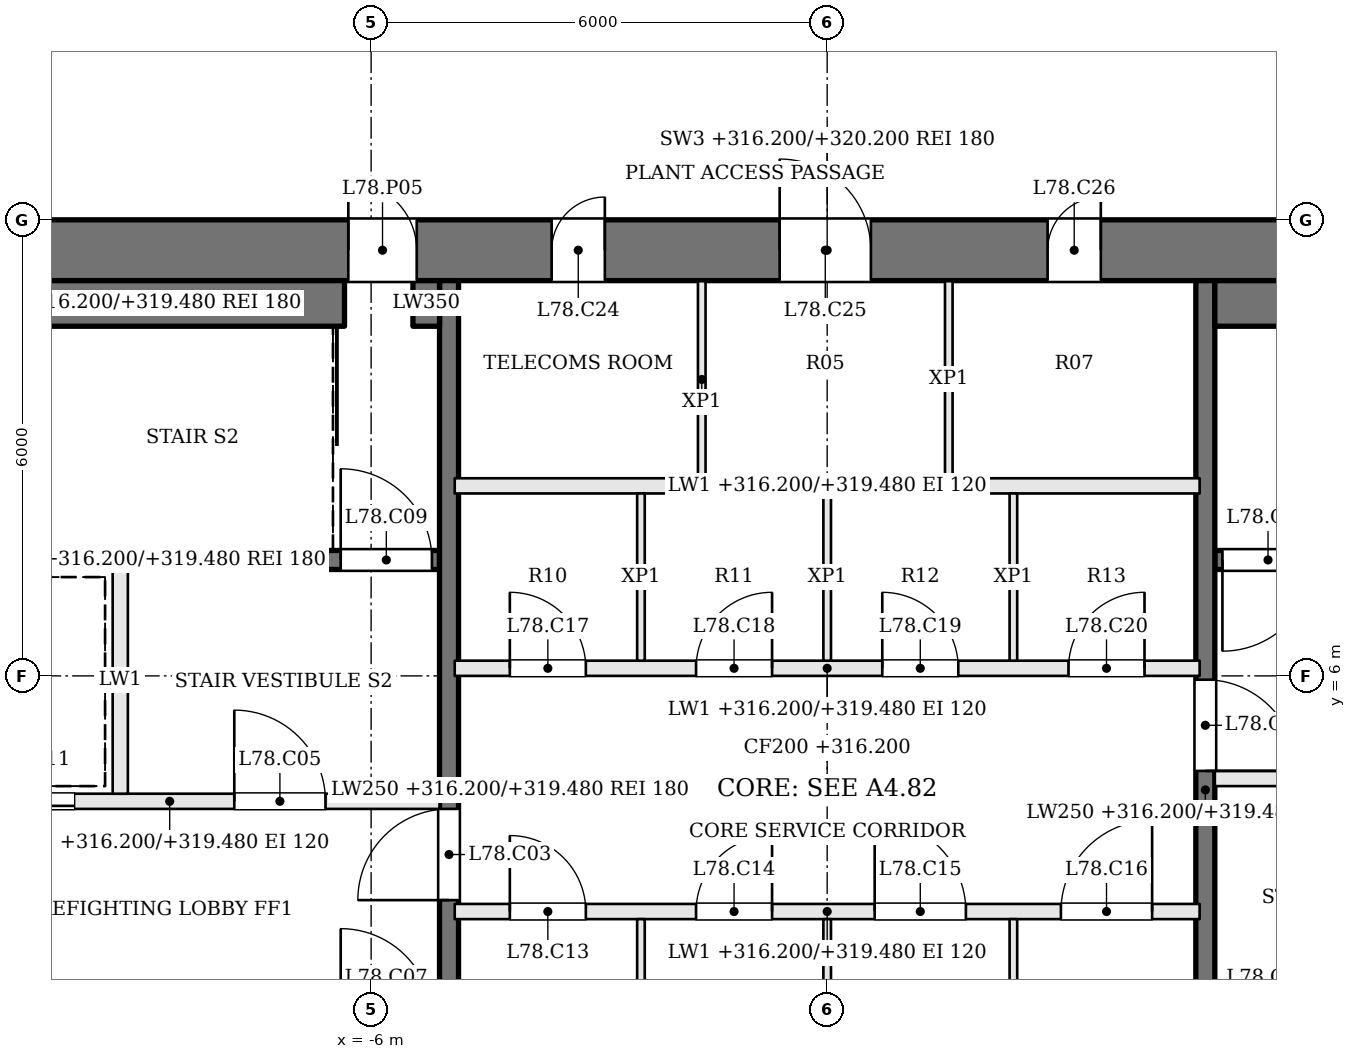
"""IFC4 building model, lengths in metres.
Left out: names, types, materials, properties, quantities, classifications, styles, units other than length and angle.
Written with IfcOpenShell. Run it as: python <this file> out.ifc"""

import sys

from ifc_helpers import new_model, si_unit, direction, frame, frame_2d, origin, place, context, subcontext, project, spatial, rectangle, extrude, element, fill, save


model = new_model("IFC4")
c1 = context("Model", 3, precision=1e-05, world=origin(), true_north=direction((0.0, 1.0)))
c2 = subcontext(c1, "Body", "Model", "MODEL_VIEW")
j1 = project(units=[si_unit("LENGTHUNIT", "METRE"), si_unit("PLANEANGLEUNIT", "RADIAN")], contexts=[c1])
p1 = place(None, origin())
s1 = spatial("IfcSite", under=j1, at=p1, CompositionType="ELEMENT")
p2 = place(p1, origin())
s2 = spatial("IfcBuilding", under=s1, at=p2, CompositionType="ELEMENT")
p3 = place(p2, frame((0.0, 0.0, 316.2)))
s3 = spatial("IfcBuildingStorey", under=s2, at=p3, CompositionType="ELEMENT", Elevation=316.2)
p4 = place(p3, frame((-13.0, 11.6, 0.0), z_axis=(0.0, 0.0, 1.0), x_axis=(1.0, 0.0, 0.0)))
e1 = element("IfcWall", 1, at=p4, inside=s3, PredefinedType="SHEAR", context=c2, shape_type="SweptSolid", body=[
    extrude(rectangle(XDim=26.0, YDim=0.8, at=frame_2d((13.0, 0.0))), origin(), (0.0, 0.0, 1.0), 4.0),
])
p5 = place(p4, frame((9.375, 0.0, 0.0)))
e2 = element("IfcOpeningElement", 2, at=p5, cuts=e1, PredefinedType="OPENING", context=c2, shape_type="SweptSolid", body=[
    extrude(rectangle(XDim=0.7, YDim=2.1, at=frame_2d((0.35, 1.05))), frame((0.0, 0.41, 0.0), z_axis=(0.0, -1.0, 0.0), x_axis=(1.0, 0.0, 0.0)), (0.0, 0.0, 1.0), 0.82),
])
p6 = place(p4, frame((12.375, 0.0, 0.0)))
e3 = element("IfcOpeningElement", 3, at=p6, cuts=e1, PredefinedType="OPENING", context=c2, shape_type="SweptSolid", body=[
    extrude(rectangle(XDim=1.2, YDim=2.1, at=frame_2d((0.6, 1.05))), frame((0.0, 0.41, 0.0), z_axis=(0.0, -1.0, 0.0), x_axis=(1.0, 0.0, 0.0)), (0.0, 0.0, 1.0), 0.82),
])
p7 = place(p4, frame((15.9, 0.0, 0.0)))
e4 = element("IfcOpeningElement", 4, at=p7, cuts=e1, PredefinedType="OPENING", context=c2, shape_type="SweptSolid", body=[
    extrude(rectangle(XDim=0.7, YDim=2.1, at=frame_2d((0.35, 1.05))), frame((0.0, 0.41, 0.0), z_axis=(0.0, -1.0, 0.0), x_axis=(1.0, 0.0, 0.0)), (0.0, 0.0, 1.0), 0.82),
])
p8 = place(p4, frame((6.7, 0.0, 0.0)))
e5 = element("IfcOpeningElement", 5, at=p8, cuts=e1, PredefinedType="OPENING", context=c2, shape_type="SweptSolid", body=[
    extrude(rectangle(XDim=0.9, YDim=2.1, at=frame_2d((0.45, 1.05))), frame((0.0, 0.41, 0.0), z_axis=(0.0, -1.0, 0.0), x_axis=(1.0, 0.0, 0.0)), (0.0, 0.0, 1.0), 0.82),
])
p9 = place(p3, frame((12.2, 7.525, 0.0), z_axis=(0.0, 0.0, 1.0), x_axis=(-1.0, 0.0, 0.0)))
e6 = element("IfcWall", 6, at=p9, inside=s3, PredefinedType="SOLIDWALL", context=c2, shape_type="SweptSolid", body=[
    extrude(rectangle(XDim=7.1, YDim=0.25, at=frame_2d((3.55, 0.0))), origin(), (0.0, 0.0, 1.0), 3.28),
])
p10 = place(p9, frame((5.8, 0.0, 0.0)))
e7 = element("IfcOpeningElement", 7, at=p10, cuts=e6, PredefinedType="OPENING", context=c2, shape_type="SweptSolid", body=[
    extrude(rectangle(XDim=1.2, YDim=2.1, at=frame_2d((0.6, 1.05))), frame((0.0, 0.135, 0.0), z_axis=(0.0, -1.0, 0.0), x_axis=(1.0, 0.0, 0.0)), (0.0, 0.0, 1.0), 0.27),
])
p11 = place(p3, frame((-12.2, 4.35, 0.0), z_axis=(0.0, 0.0, 1.0), x_axis=(1.0, 0.0, 0.0)))
e8 = element("IfcWall", 8, at=p11, inside=s3, PredefinedType="SOLIDWALL", context=c2, shape_type="SweptSolid", body=[
    extrude(rectangle(XDim=7.1, YDim=0.2, at=frame_2d((3.55, 0.0))), origin(), (0.0, 0.0, 1.0), 3.28),
])
p12 = place(p11, frame((4.4, 0.0, 0.0)))
e9 = element("IfcOpeningElement", 9, at=p12, cuts=e8, PredefinedType="OPENING", context=c2, shape_type="SweptSolid", body=[
    extrude(rectangle(XDim=1.2, YDim=2.1, at=frame_2d((0.6, 1.05))), frame((0.0, 0.11, 0.0), z_axis=(0.0, -1.0, 0.0), x_axis=(1.0, 0.0, 0.0)), (0.0, 0.0, 1.0), 0.22),
])
p13 = place(p11, frame((1.1, 0.0, 0.0)))
e10 = element("IfcOpeningElement", 10, at=p13, cuts=e8, PredefinedType="OPENING", context=c2, shape_type="SweptSolid", body=[
    extrude(rectangle(XDim=1.2, YDim=2.1, at=frame_2d((0.6, 1.05))), frame((0.0, 0.11, 0.0), z_axis=(0.0, -1.0, 0.0), x_axis=(1.0, 0.0, 0.0)), (0.0, 0.0, 1.0), 0.22),
])
p14 = place(p3, frame((12.2, 4.65, 0.0), z_axis=(0.0, 0.0, 1.0), x_axis=(-1.0, 0.0, 0.0)))
e11 = element("IfcWall", 11, at=p14, inside=s3, PredefinedType="SOLIDWALL", context=c2, shape_type="SweptSolid", body=[
    extrude(rectangle(XDim=7.1, YDim=0.2, at=frame_2d((3.55, 0.0))), origin(), (0.0, 0.0, 1.0), 3.28),
])
p15 = place(p14, frame((4.4, 0.0, 0.0)))
e12 = element("IfcOpeningElement", 12, at=p15, cuts=e11, PredefinedType="OPENING", context=c2, shape_type="SweptSolid", body=[
    extrude(rectangle(XDim=1.2, YDim=2.1, at=frame_2d((0.6, 1.05))), frame((0.0, 0.11, 0.0), z_axis=(0.0, -1.0, 0.0), x_axis=(1.0, 0.0, 0.0)), (0.0, 0.0, 1.0), 0.22),
])
p16 = place(p14, frame((1.1, 0.0, 0.0)))
e13 = element("IfcOpeningElement", 13, at=p16, cuts=e11, PredefinedType="OPENING", context=c2, shape_type="SweptSolid", body=[
    extrude(rectangle(XDim=1.2, YDim=2.1, at=frame_2d((0.6, 1.05))), frame((0.0, 0.11, 0.0), z_axis=(0.0, -1.0, 0.0), x_axis=(1.0, 0.0, 0.0)), (0.0, 0.0, 1.0), 0.22),
])
p17 = place(p3, frame((-12.2, 7.525, 0.0), z_axis=(0.0, 0.0, 1.0), x_axis=(1.0, 0.0, 0.0)))
e14 = element("IfcWall", 14, at=p17, inside=s3, PredefinedType="SOLIDWALL", context=c2, shape_type="SweptSolid", body=[
    extrude(rectangle(XDim=7.1, YDim=0.25, at=frame_2d((3.55, 0.0))), origin(), (0.0, 0.0, 1.0), 3.28),
])
p18 = place(p17, frame((5.8, 0.0, 0.0)))
e15 = element("IfcOpeningElement", 15, at=p18, cuts=e14, PredefinedType="OPENING", context=c2, shape_type="SweptSolid", body=[
    extrude(rectangle(XDim=1.2, YDim=2.1, at=frame_2d((0.6, 1.05))), frame((0.0, 0.135, 0.0), z_axis=(0.0, -1.0, 0.0), x_axis=(1.0, 0.0, 0.0)), (0.0, 0.0, 1.0), 0.27),
])
p19 = place(p3, frame((-9.3, 4.45, 0.0), z_axis=(0.0, 0.0, 1.0), x_axis=(0.0, 1.0, 0.0)))
e16 = element("IfcWall", 16, at=p19, inside=s3, PredefinedType="SOLIDWALL", context=c2, shape_type="SweptSolid", body=[
    extrude(rectangle(XDim=3.0, YDim=0.2, at=frame_2d((1.5, 0.0))), origin(), (0.0, 0.0, 1.0), 3.28),
])
p20 = place(p3, frame((-4.975, -2.2, 0.0), z_axis=(0.0, 0.0, 1.0), x_axis=(0.0, 1.0, 0.0)))
e17 = element("IfcWall", 17, at=p20, inside=s3, PredefinedType="SOLIDWALL", context=c2, shape_type="SweptSolid", body=[
    extrude(rectangle(XDim=13.4, YDim=0.25, at=frame_2d((6.7, 0.0))), origin(), (0.0, 0.0, 1.0), 3.28),
])
p21 = place(p20, frame((5.25, 0.0, 0.0)))
e18 = element("IfcOpeningElement", 18, at=p21, cuts=e17, PredefinedType="OPENING", context=c2, shape_type="SweptSolid", body=[
    extrude(rectangle(XDim=1.2, YDim=2.1, at=frame_2d((0.6, 1.05))), frame((0.0, 0.135, 0.0), z_axis=(0.0, -1.0, 0.0), x_axis=(1.0, 0.0, 0.0)), (0.0, 0.0, 1.0), 0.27),
])
p22 = place(p3, frame((4.975, 11.2, 0.0), z_axis=(0.0, 0.0, 1.0), x_axis=(0.0, -1.0, 0.0)))
e19 = element("IfcWall", 19, at=p22, inside=s3, PredefinedType="SOLIDWALL", context=c2, shape_type="SweptSolid", body=[
    extrude(rectangle(XDim=13.4, YDim=0.25, at=frame_2d((6.7, 0.0))), origin(), (0.0, 0.0, 1.0), 3.28),
])
p23 = place(p22, frame((5.25, 0.0, 0.0)))
e20 = element("IfcOpeningElement", 20, at=p23, cuts=e19, PredefinedType="OPENING", context=c2, shape_type="SweptSolid", body=[
    extrude(rectangle(XDim=1.2, YDim=2.1, at=frame_2d((0.6, 1.05))), frame((0.0, 0.135, 0.0), z_axis=(0.0, -1.0, 0.0), x_axis=(1.0, 0.0, 0.0)), (0.0, 0.0, 1.0), 0.27),
])
p24 = place(p3, frame((-12.2, 10.9, 0.0), z_axis=(0.0, 0.0, 1.0), x_axis=(1.0, 0.0, 0.0)))
e21 = element("IfcWall", 21, at=p24, inside=s3, PredefinedType="SOLIDWALL", context=c2, shape_type="SweptSolid", body=[
    extrude(rectangle(XDim=5.85, YDim=0.6, at=frame_2d((2.925, 0.0))), origin(), (0.0, 0.0, 1.0), 3.28),
])
p25 = place(p3, frame((-5.275, 10.6, 0.0), z_axis=(0.0, 0.0, 1.0), x_axis=(0.0, 1.0, 0.0)))
e22 = element("IfcWall", 22, at=p25, inside=s3, PredefinedType="SOLIDWALL", context=c2, shape_type="SweptSolid", body=[
    extrude(rectangle(XDim=0.6, YDim=0.35, at=frame_2d((0.3, 0.0))), origin(), (0.0, 0.0, 1.0), 3.28),
])
p26 = place(p3, frame((12.2, 10.9, 0.0), z_axis=(0.0, 0.0, 1.0), x_axis=(-1.0, 0.0, 0.0)))
e23 = element("IfcWall", 23, at=p26, inside=s3, PredefinedType="SOLIDWALL", context=c2, shape_type="SweptSolid", body=[
    extrude(rectangle(XDim=7.1, YDim=0.6, at=frame_2d((3.55, 0.0))), origin(), (0.0, 0.0, 1.0), 3.28),
])
p27 = place(p3, frame((-4.9, 2.9, 0.0), z_axis=(0.0, 0.0, 1.0), x_axis=(1.0, 0.0, 0.0)))
e24 = element("IfcWall", 24, at=p27, inside=s3, PredefinedType="SOLIDWALL", context=c2, shape_type="SweptSolid", body=[
    extrude(rectangle(XDim=9.8, YDim=0.2, at=frame_2d((4.9, 0.0))), origin(), (0.0, 0.0, 1.0), 3.28),
])
p28 = place(p27, frame((0.725, 0.0, 0.0)))
e25 = element("IfcOpeningElement", 25, at=p28, cuts=e24, PredefinedType="OPENING", context=c2, shape_type="SweptSolid", body=[
    extrude(rectangle(XDim=1.0, YDim=2.1, at=frame_2d((0.5, 1.05))), frame((0.0, 0.11, 0.0), z_axis=(0.0, -1.0, 0.0), x_axis=(1.0, 0.0, 0.0)), (0.0, 0.0, 1.0), 0.22),
])
p29 = place(p27, frame((3.175, 0.0, 0.0)))
e26 = element("IfcOpeningElement", 26, at=p29, cuts=e24, PredefinedType="OPENING", context=c2, shape_type="SweptSolid", body=[
    extrude(rectangle(XDim=1.0, YDim=2.1, at=frame_2d((0.5, 1.05))), frame((0.0, 0.11, 0.0), z_axis=(0.0, -1.0, 0.0), x_axis=(1.0, 0.0, 0.0)), (0.0, 0.0, 1.0), 0.22),
])
p30 = place(p27, frame((5.525, 0.0, 0.0)))
e27 = element("IfcOpeningElement", 27, at=p30, cuts=e24, PredefinedType="OPENING", context=c2, shape_type="SweptSolid", body=[
    extrude(rectangle(XDim=1.2, YDim=2.1, at=frame_2d((0.6, 1.05))), frame((0.0, 0.11, 0.0), z_axis=(0.0, -1.0, 0.0), x_axis=(1.0, 0.0, 0.0)), (0.0, 0.0, 1.0), 0.22),
])
p31 = place(p27, frame((7.975, 0.0, 0.0)))
e28 = element("IfcOpeningElement", 28, at=p31, cuts=e24, PredefinedType="OPENING", context=c2, shape_type="SweptSolid", body=[
    extrude(rectangle(XDim=1.2, YDim=2.1, at=frame_2d((0.6, 1.05))), frame((0.0, 0.11, 0.0), z_axis=(0.0, -1.0, 0.0), x_axis=(1.0, 0.0, 0.0)), (0.0, 0.0, 1.0), 0.22),
])
p32 = place(p3, frame((-4.9, 6.1, 0.0), z_axis=(0.0, 0.0, 1.0), x_axis=(1.0, 0.0, 0.0)))
e29 = element("IfcWall", 29, at=p32, inside=s3, PredefinedType="SOLIDWALL", context=c2, shape_type="SweptSolid", body=[
    extrude(rectangle(XDim=9.8, YDim=0.2, at=frame_2d((4.9, 0.0))), origin(), (0.0, 0.0, 1.0), 3.28),
])
p33 = place(p32, frame((0.725, 0.0, 0.0)))
e30 = element("IfcOpeningElement", 30, at=p33, cuts=e29, PredefinedType="OPENING", context=c2, shape_type="SweptSolid", body=[
    extrude(rectangle(XDim=1.0, YDim=2.1, at=frame_2d((0.5, 1.05))), frame((0.0, 0.11, 0.0), z_axis=(0.0, -1.0, 0.0), x_axis=(1.0, 0.0, 0.0)), (0.0, 0.0, 1.0), 0.22),
])
p34 = place(p32, frame((3.175, 0.0, 0.0)))
e31 = element("IfcOpeningElement", 31, at=p34, cuts=e29, PredefinedType="OPENING", context=c2, shape_type="SweptSolid", body=[
    extrude(rectangle(XDim=1.0, YDim=2.1, at=frame_2d((0.5, 1.05))), frame((0.0, 0.11, 0.0), z_axis=(0.0, -1.0, 0.0), x_axis=(1.0, 0.0, 0.0)), (0.0, 0.0, 1.0), 0.22),
])
p35 = place(p32, frame((5.625, 0.0, 0.0)))
e32 = element("IfcOpeningElement", 32, at=p35, cuts=e29, PredefinedType="OPENING", context=c2, shape_type="SweptSolid", body=[
    extrude(rectangle(XDim=1.0, YDim=2.1, at=frame_2d((0.5, 1.05))), frame((0.0, 0.11, 0.0), z_axis=(0.0, -1.0, 0.0), x_axis=(1.0, 0.0, 0.0)), (0.0, 0.0, 1.0), 0.22),
])
p36 = place(p32, frame((8.075, 0.0, 0.0)))
e33 = element("IfcOpeningElement", 33, at=p36, cuts=e29, PredefinedType="OPENING", context=c2, shape_type="SweptSolid", body=[
    extrude(rectangle(XDim=1.0, YDim=2.1, at=frame_2d((0.5, 1.05))), frame((0.0, 0.11, 0.0), z_axis=(0.0, -1.0, 0.0), x_axis=(1.0, 0.0, 0.0)), (0.0, 0.0, 1.0), 0.22),
])
p37 = place(p3, frame((-4.9, 8.5, 0.0), z_axis=(0.0, 0.0, 1.0), x_axis=(1.0, 0.0, 0.0)))
e34 = element("IfcWall", 34, at=p37, inside=s3, PredefinedType="SOLIDWALL", context=c2, shape_type="SweptSolid", body=[
    extrude(rectangle(XDim=9.8, YDim=0.2, at=frame_2d((4.9, 0.0))), origin(), (0.0, 0.0, 1.0), 3.28),
])
for number, where, z_axis, x_axis in (
    (35, (-2.45, 0.6, 0.0), (0.0, 0.0, 1.0), (0.0, 1.0, 0.0)),
    (36, (0.0, 0.6, 0.0), (0.0, 0.0, 1.0), (0.0, 1.0, 0.0)),
    (37, (2.45, 0.6, 0.0), (0.0, 0.0, 1.0), (0.0, 1.0, 0.0)),
    (38, (-2.45, 6.2, 0.0), (0.0, 0.0, 1.0), (0.0, 1.0, 0.0)),
    (39, (0.0, 6.2, 0.0), (0.0, 0.0, 1.0), (0.0, 1.0, 0.0)),
    (40, (2.45, 6.2, 0.0), (0.0, 0.0, 1.0), (0.0, 1.0, 0.0)),
):
    element("IfcWall", number, at=place(p3, frame(where, z_axis=z_axis, x_axis=x_axis)), inside=s3, PredefinedType="PARTITIONING", context=c2, shape_type="SweptSolid", body=[
        extrude(rectangle(XDim=2.2, YDim=0.1, at=frame_2d((1.1, 0.0))), origin(), (0.0, 0.0, 1.0), 3.28),
    ])
for number, where, z_axis, x_axis in (
    (41, (-1.65, 8.6, 0.0), (0.0, 0.0, 1.0), (0.0, 1.0, 0.0)),
    (42, (1.6, 8.6, 0.0), (0.0, 0.0, 1.0), (0.0, 1.0, 0.0)),
):
    element("IfcWall", number, at=place(p3, frame(where, z_axis=z_axis, x_axis=x_axis)), inside=s3, PredefinedType="PARTITIONING", context=c2, shape_type="SweptSolid", body=[
        extrude(rectangle(XDim=2.6, YDim=0.1, at=frame_2d((1.3, 0.0))), origin(), (0.0, 0.0, 1.0), 3.28),
    ])
p38 = place(p21, origin())
e43 = element("IfcDoor", 43, at=p38, inside=s3, OperationType="SINGLE_SWING_LEFT", PredefinedType="DOOR", context=c2, shape_type="SweptSolid", body=[
    extrude(rectangle(XDim=1.2, YDim=2.1, at=frame_2d((0.6, 1.05))), frame((0.0, 0.025, 0.0), z_axis=(0.0, -1.0, 0.0), x_axis=(1.0, 0.0, 0.0)), (0.0, 0.0, 1.0), 0.05),
])
fill(e18, e43)
p39 = place(p23, origin())
e44 = element("IfcDoor", 44, at=p39, inside=s3, OperationType="SINGLE_SWING_RIGHT", PredefinedType="DOOR", context=c2, shape_type="SweptSolid", body=[
    extrude(rectangle(XDim=1.2, YDim=2.1, at=frame_2d((0.6, 1.05))), frame((0.0, 0.025, 0.0), z_axis=(0.0, -1.0, 0.0), x_axis=(1.0, 0.0, 0.0)), (0.0, 0.0, 1.0), 0.05),
])
fill(e20, e44)
p40 = place(p12, origin())
e45 = element("IfcDoor", 45, at=p40, inside=s3, OperationType="SINGLE_SWING_LEFT", PredefinedType="DOOR", context=c2, shape_type="SweptSolid", body=[
    extrude(rectangle(XDim=1.2, YDim=2.1, at=frame_2d((0.6, 1.05))), frame((0.0, 0.025, 0.0), z_axis=(0.0, -1.0, 0.0), x_axis=(1.0, 0.0, 0.0)), (0.0, 0.0, 1.0), 0.05),
])
fill(e9, e45)
p41 = place(p10, origin())
e46 = element("IfcDoor", 46, at=p41, inside=s3, OperationType="SINGLE_SWING_RIGHT", PredefinedType="DOOR", context=c2, shape_type="SweptSolid", body=[
    extrude(rectangle(XDim=1.2, YDim=2.1, at=frame_2d((0.6, 1.05))), frame((0.0, 0.025, 0.0), z_axis=(0.0, -1.0, 0.0), x_axis=(1.0, 0.0, 0.0)), (0.0, 0.0, 1.0), 0.05),
])
fill(e7, e46)
p42 = place(p18, origin())
e47 = element("IfcDoor", 47, at=p42, inside=s3, OperationType="SINGLE_SWING_LEFT", PredefinedType="DOOR", context=c2, shape_type="SweptSolid", body=[
    extrude(rectangle(XDim=1.2, YDim=2.1, at=frame_2d((0.6, 1.05))), frame((0.0, 0.025, 0.0), z_axis=(0.0, -1.0, 0.0), x_axis=(1.0, 0.0, 0.0)), (0.0, 0.0, 1.0), 0.05),
])
fill(e15, e47)
p43 = place(p13, origin())
e48 = element("IfcDoor", 48, at=p43, inside=s3, OperationType="SLIDING_TO_RIGHT", PredefinedType="DOOR", context=c2, shape_type="SweptSolid", body=[
    extrude(rectangle(XDim=1.2, YDim=2.1, at=frame_2d((0.6, 1.05))), frame((0.0, 0.025, 0.0), z_axis=(0.0, -1.0, 0.0), x_axis=(1.0, 0.0, 0.0)), (0.0, 0.0, 1.0), 0.05),
])
fill(e10, e48)
p44 = place(p28, origin())
e49 = element("IfcDoor", 49, at=p44, inside=s3, OperationType="SINGLE_SWING_LEFT", PredefinedType="DOOR", context=c2, shape_type="SweptSolid", body=[
    extrude(rectangle(XDim=1.0, YDim=2.1, at=frame_2d((0.5, 1.05))), frame((0.0, 0.025, 0.0), z_axis=(0.0, -1.0, 0.0), x_axis=(1.0, 0.0, 0.0)), (0.0, 0.0, 1.0), 0.05),
])
fill(e25, e49)
p45 = place(p29, origin())
e50 = element("IfcDoor", 50, at=p45, inside=s3, OperationType="SINGLE_SWING_RIGHT", PredefinedType="DOOR", context=c2, shape_type="SweptSolid", body=[
    extrude(rectangle(XDim=1.0, YDim=2.1, at=frame_2d((0.5, 1.05))), frame((0.0, 0.025, 0.0), z_axis=(0.0, -1.0, 0.0), x_axis=(1.0, 0.0, 0.0)), (0.0, 0.0, 1.0), 0.05),
])
fill(e26, e50)
p46 = place(p30, origin())
e51 = element("IfcDoor", 51, at=p46, inside=s3, OperationType="SINGLE_SWING_LEFT", PredefinedType="DOOR", context=c2, shape_type="SweptSolid", body=[
    extrude(rectangle(XDim=1.2, YDim=2.1, at=frame_2d((0.6, 1.05))), frame((0.0, 0.025, 0.0), z_axis=(0.0, -1.0, 0.0), x_axis=(1.0, 0.0, 0.0)), (0.0, 0.0, 1.0), 0.05),
])
fill(e27, e51)
p47 = place(p31, origin())
e52 = element("IfcDoor", 52, at=p47, inside=s3, OperationType="SINGLE_SWING_RIGHT", PredefinedType="DOOR", context=c2, shape_type="SweptSolid", body=[
    extrude(rectangle(XDim=1.2, YDim=2.1, at=frame_2d((0.6, 1.05))), frame((0.0, 0.025, 0.0), z_axis=(0.0, -1.0, 0.0), x_axis=(1.0, 0.0, 0.0)), (0.0, 0.0, 1.0), 0.05),
])
fill(e28, e52)
p48 = place(p33, origin())
e53 = element("IfcDoor", 53, at=p48, inside=s3, OperationType="SINGLE_SWING_LEFT", PredefinedType="DOOR", context=c2, shape_type="SweptSolid", body=[
    extrude(rectangle(XDim=1.0, YDim=2.1, at=frame_2d((0.5, 1.05))), frame((0.0, 0.025, 0.0), z_axis=(0.0, -1.0, 0.0), x_axis=(1.0, 0.0, 0.0)), (0.0, 0.0, 1.0), 0.05),
])
fill(e30, e53)
p49 = place(p34, origin())
e54 = element("IfcDoor", 54, at=p49, inside=s3, OperationType="SINGLE_SWING_RIGHT", PredefinedType="DOOR", context=c2, shape_type="SweptSolid", body=[
    extrude(rectangle(XDim=1.0, YDim=2.1, at=frame_2d((0.5, 1.05))), frame((0.0, 0.025, 0.0), z_axis=(0.0, -1.0, 0.0), x_axis=(1.0, 0.0, 0.0)), (0.0, 0.0, 1.0), 0.05),
])
fill(e31, e54)
p50 = place(p35, origin())
e55 = element("IfcDoor", 55, at=p50, inside=s3, OperationType="SINGLE_SWING_LEFT", PredefinedType="DOOR", context=c2, shape_type="SweptSolid", body=[
    extrude(rectangle(XDim=1.0, YDim=2.1, at=frame_2d((0.5, 1.05))), frame((0.0, 0.025, 0.0), z_axis=(0.0, -1.0, 0.0), x_axis=(1.0, 0.0, 0.0)), (0.0, 0.0, 1.0), 0.05),
])
fill(e32, e55)
p51 = place(p36, origin())
e56 = element("IfcDoor", 56, at=p51, inside=s3, OperationType="SINGLE_SWING_RIGHT", PredefinedType="DOOR", context=c2, shape_type="SweptSolid", body=[
    extrude(rectangle(XDim=1.0, YDim=2.1, at=frame_2d((0.5, 1.05))), frame((0.0, 0.025, 0.0), z_axis=(0.0, -1.0, 0.0), x_axis=(1.0, 0.0, 0.0)), (0.0, 0.0, 1.0), 0.05),
])
fill(e33, e56)
p52 = place(p5, origin())
e57 = element("IfcDoor", 57, at=p52, inside=s3, OperationType="SINGLE_SWING_RIGHT", PredefinedType="DOOR", context=c2, shape_type="SweptSolid", body=[
    extrude(rectangle(XDim=0.7, YDim=2.1, at=frame_2d((0.35, 1.05))), frame((0.0, 0.025, 0.0), z_axis=(0.0, -1.0, 0.0), x_axis=(1.0, 0.0, 0.0)), (0.0, 0.0, 1.0), 0.05),
])
fill(e2, e57)
p53 = place(p6, origin())
e58 = element("IfcDoor", 58, at=p53, inside=s3, OperationType="SINGLE_SWING_LEFT", PredefinedType="DOOR", context=c2, shape_type="SweptSolid", body=[
    extrude(rectangle(XDim=1.2, YDim=2.1, at=frame_2d((0.6, 1.05))), frame((0.0, 0.025, 0.0), z_axis=(0.0, -1.0, 0.0), x_axis=(1.0, 0.0, 0.0)), (0.0, 0.0, 1.0), 0.05),
])
fill(e3, e58)
p54 = place(p7, origin())
e59 = element("IfcDoor", 59, at=p54, inside=s3, OperationType="SINGLE_SWING_RIGHT", PredefinedType="DOOR", context=c2, shape_type="SweptSolid", body=[
    extrude(rectangle(XDim=0.7, YDim=2.1, at=frame_2d((0.35, 1.05))), frame((0.0, 0.025, 0.0), z_axis=(0.0, -1.0, 0.0), x_axis=(1.0, 0.0, 0.0)), (0.0, 0.0, 1.0), 0.05),
])
fill(e4, e59)
p55 = place(p8, origin())
e60 = element("IfcDoor", 60, at=p55, inside=s3, OperationType="SINGLE_SWING_LEFT", PredefinedType="DOOR", context=c2, shape_type="SweptSolid", body=[
    extrude(rectangle(XDim=0.9, YDim=2.1, at=frame_2d((0.45, 1.05))), frame((0.0, 0.025, 0.0), z_axis=(0.0, -1.0, 0.0), x_axis=(1.0, 0.0, 0.0)), (0.0, 0.0, 1.0), 0.05),
])
fill(e5, e60)
save(model, sys.argv[1])
